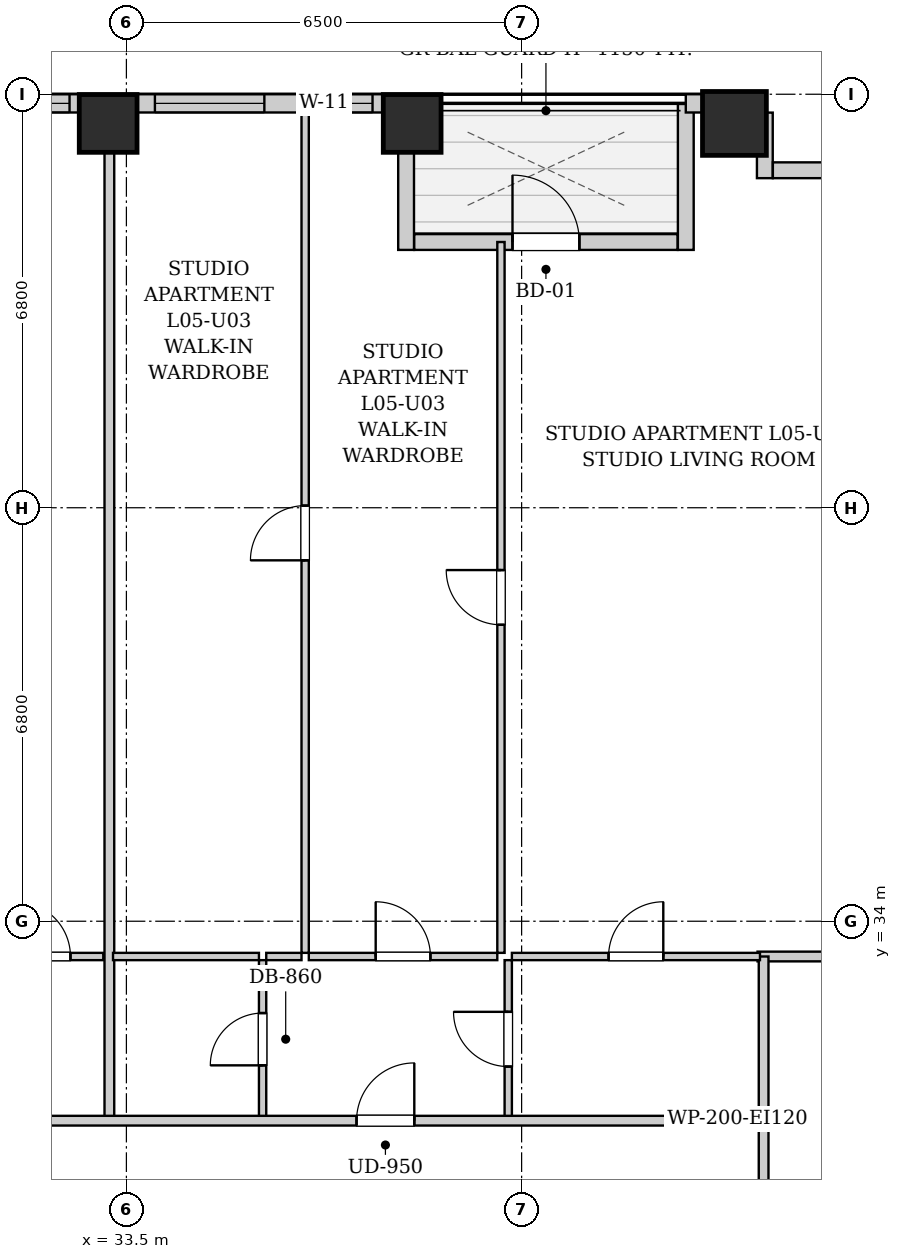
"""IFC4 building model, lengths in metres.
Left out: names, types, materials, properties, quantities, classifications, styles, units other than length and angle.
Written with IfcOpenShell. Run it as: python <this file> out.ifc"""

import sys

from ifc_helpers import new_model, si_unit, direction, frame, frame_2d, origin, origin_2d, place, context, subcontext, project, spatial, rectangle, extrude, element, fill, save


model = new_model("IFC4")
c1 = context("Model", 3, precision=1e-05, world=origin(), true_north=direction((0.0, 1.0)))
c2 = subcontext(c1, "Body", "Model", "MODEL_VIEW")
j1 = project(units=[si_unit("LENGTHUNIT", "METRE"), si_unit("PLANEANGLEUNIT", "RADIAN")], contexts=[c1])
p1 = place(None, origin())
s1 = spatial("IfcSite", under=j1, at=p1, CompositionType="ELEMENT")
p2 = place(p1, origin())
s2 = spatial("IfcBuilding", under=s1, at=p2, CompositionType="ELEMENT")
p3 = place(p2, frame((0.0, 0.0, 25.8)))
s3 = spatial("IfcBuildingStorey", under=s2, at=p3, CompositionType="ELEMENT", Elevation=25.8)
for number, where, z_axis, x_axis in (
    (1, (33.2, 47.12, 0.0), (0.0, 0.0, 1.0), (1.0, 0.0, 0.0)),
    (2, (38.2, 47.12, 0.0), (0.0, 0.0, 1.0), (1.0, 0.0, 0.0)),
):
    element("IfcColumn", number, at=place(p3, frame(where, z_axis=z_axis, x_axis=x_axis)), inside=s3, PredefinedType="COLUMN", context=c2, shape_type="SweptSolid", body=[
        extrude(rectangle(XDim=0.95, YDim=0.95, at=origin_2d()), origin(), (0.0, 0.0, 1.0), 3.2),
    ])
p4 = place(p3, frame((43.5, 47.12, 0.0), z_axis=(0.0, 0.0, 1.0), x_axis=(1.0, 0.0, 0.0)))
e3 = element("IfcColumn", 3, at=p4, inside=s3, PredefinedType="COLUMN", context=c2, shape_type="SweptSolid", body=[
    extrude(rectangle(XDim=1.05, YDim=1.05, at=origin_2d()), origin(), (0.0, 0.0, 1.0), 3.2),
])
p5 = place(p3, frame((10.0, 47.45, 0.0), z_axis=(0.0, 0.0, 1.0), x_axis=(1.0, 0.0, 0.0)))
e4 = element("IfcWall", 4, at=p5, inside=s3, PredefinedType="SOLIDWALL", context=c2, shape_type="SweptSolid", body=[
    extrude(rectangle(XDim=28.1, YDim=0.3, at=frame_2d((14.05, 0.0))), origin(), (0.0, 0.0, 1.0), 1.975),
])
p6 = place(p5, frame((5.712, 0.0, 0.55)))
e5 = element("IfcOpeningElement", 5, at=p6, cuts=e4, PredefinedType="OPENING", context=c2, shape_type="SweptSolid", body=[
    extrude(rectangle(XDim=1.35, YDim=1.2, at=frame_2d((0.675, 0.6))), frame((0.0, 0.16, 0.0), z_axis=(0.0, -1.0, 0.0), x_axis=(1.0, 0.0, 0.0)), (0.0, 0.0, 1.0), 0.32),
])
p7 = place(p5, frame((8.792, 0.0, 0.55)))
e6 = element("IfcOpeningElement", 6, at=p7, cuts=e4, PredefinedType="OPENING", context=c2, shape_type="SweptSolid", body=[
    extrude(rectangle(XDim=1.8, YDim=1.2, at=frame_2d((0.9, 0.6))), frame((0.0, 0.16, 0.0), z_axis=(0.0, -1.0, 0.0), x_axis=(1.0, 0.0, 0.0)), (0.0, 0.0, 1.0), 0.32),
])
p8 = place(p5, frame((18.86, 0.0, 0.55)))
e7 = element("IfcOpeningElement", 7, at=p8, cuts=e4, PredefinedType="OPENING", context=c2, shape_type="SweptSolid", body=[
    extrude(rectangle(XDim=1.8, YDim=1.2, at=frame_2d((0.9, 0.6))), frame((0.0, 0.16, 0.0), z_axis=(0.0, -1.0, 0.0), x_axis=(1.0, 0.0, 0.0)), (0.0, 0.0, 1.0), 0.32),
])
p9 = place(p5, frame((21.215, 0.0, 0.55)))
e8 = element("IfcOpeningElement", 8, at=p9, cuts=e4, PredefinedType="OPENING", context=c2, shape_type="SweptSolid", body=[
    extrude(rectangle(XDim=1.35, YDim=1.2, at=frame_2d((0.675, 0.6))), frame((0.0, 0.16, 0.0), z_axis=(0.0, -1.0, 0.0), x_axis=(1.0, 0.0, 0.0)), (0.0, 0.0, 1.0), 0.32),
])
p10 = place(p5, frame((23.969, 0.0, 0.55)))
e9 = element("IfcOpeningElement", 9, at=p10, cuts=e4, PredefinedType="OPENING", context=c2, shape_type="SweptSolid", body=[
    extrude(rectangle(XDim=1.8, YDim=1.2, at=frame_2d((0.9, 0.6))), frame((0.0, 0.16, 0.0), z_axis=(0.0, -1.0, 0.0), x_axis=(1.0, 0.0, 0.0)), (0.0, 0.0, 1.0), 0.32),
])
p11 = place(p5, frame((26.698, 0.0, 0.55)))
e10 = element("IfcOpeningElement", 10, at=p11, cuts=e4, PredefinedType="OPENING", context=c2, shape_type="SweptSolid", body=[
    extrude(rectangle(XDim=0.85, YDim=1.2, at=frame_2d((0.425, 0.6))), frame((0.0, 0.16, 0.0), z_axis=(0.0, -1.0, 0.0), x_axis=(1.0, 0.0, 0.0)), (0.0, 0.0, 1.0), 0.32),
])
p12 = place(p3, frame((38.1, 47.44, 0.0), z_axis=(0.0, 0.0, 1.0), x_axis=(0.0, -1.0, 0.0)))
e11 = element("IfcWall", 11, at=p12, inside=s3, PredefinedType="SOLIDWALL", context=c2, shape_type="SweptSolid", body=[
    extrude(rectangle(XDim=2.4, YDim=0.26, at=frame_2d((1.2, 0.0))), origin(), (0.0, 0.0, 1.0), 2.94),
])
p13 = place(p3, frame((38.234, 45.17, 0.0), z_axis=(0.0, 0.0, 1.0), x_axis=(1.0, 0.0, 0.0)))
e12 = element("IfcWall", 12, at=p13, inside=s3, PredefinedType="SOLIDWALL", context=c2, shape_type="SweptSolid", body=[
    extrude(rectangle(XDim=4.332, YDim=0.26, at=frame_2d((2.166, 0.0))), origin(), (0.0, 0.0, 1.0), 2.94),
])
p14 = place(p13, frame((1.616, 0.0, 0.0)))
e13 = element("IfcOpeningElement", 13, at=p14, cuts=e12, PredefinedType="OPENING", context=c2, shape_type="SweptSolid", body=[
    extrude(rectangle(XDim=1.1, YDim=2.0, at=frame_2d((0.55, 1.0))), frame((0.0, 0.14, 0.0), z_axis=(0.0, -1.0, 0.0), x_axis=(1.0, 0.0, 0.0)), (0.0, 0.0, 1.0), 0.28),
])
p15 = place(p3, frame((42.7, 45.04, 0.0), z_axis=(0.0, 0.0, 1.0), x_axis=(0.0, 1.0, 0.0)))
e14 = element("IfcWall", 14, at=p15, inside=s3, PredefinedType="SOLIDWALL", context=c2, shape_type="SweptSolid", body=[
    extrude(rectangle(XDim=2.4, YDim=0.26, at=frame_2d((1.2, 0.0))), origin(), (0.0, 0.0, 1.0), 2.94),
])
p16 = place(p3, frame((42.7, 47.45, 0.0), z_axis=(0.0, 0.0, 1.0), x_axis=(1.0, 0.0, 0.0)))
e15 = element("IfcWall", 15, at=p16, inside=s3, PredefinedType="SOLIDWALL", context=c2, shape_type="SweptSolid", body=[
    extrude(rectangle(XDim=1.3, YDim=0.3, at=frame_2d((0.65, 0.0))), origin(), (0.0, 0.0, 1.0), 1.975),
])
p17 = place(p3, frame((44.0, 47.298, 0.0), z_axis=(0.0, 0.0, 1.0), x_axis=(0.0, -1.0, 0.0)))
e16 = element("IfcWall", 16, at=p17, inside=s3, PredefinedType="SOLIDWALL", context=c2, shape_type="SweptSolid", body=[
    extrude(rectangle(XDim=1.078, YDim=0.26, at=frame_2d((0.539, 0.0))), origin(), (0.0, 0.0, 1.0), 2.94),
])
p18 = place(p3, frame((44.132, 46.35, 0.0), z_axis=(0.0, 0.0, 1.0), x_axis=(1.0, 0.0, 0.0)))
e17 = element("IfcWall", 17, at=p18, inside=s3, PredefinedType="SOLIDWALL", context=c2, shape_type="SweptSolid", body=[
    extrude(rectangle(XDim=1.248, YDim=0.26, at=frame_2d((0.624, 0.0))), origin(), (0.0, 0.0, 1.0), 2.94),
])
p19 = place(p3, frame((43.98, 28.98, 0.0), z_axis=(0.0, 0.0, 1.0), x_axis=(0.0, 1.0, 0.0)))
e18 = element("IfcWall", 18, at=p19, inside=s3, PredefinedType="PARTITIONING", context=c2, shape_type="SweptSolid", body=[
    extrude(rectangle(XDim=1.74, YDim=0.16, at=frame_2d((0.87, 0.0))), origin(), (0.0, 0.0, 1.0), 2.94),
])
p20 = place(p3, frame((31.14, 33.42, 0.0), z_axis=(0.0, 0.0, 1.0), x_axis=(1.0, 0.0, 0.0)))
e19 = element("IfcWall", 19, at=p20, inside=s3, PredefinedType="PARTITIONING", context=c2, shape_type="SweptSolid", body=[
    extrude(rectangle(XDim=1.98, YDim=0.12, at=frame_2d((0.99, 0.0))), origin(), (0.0, 0.0, 1.0), 2.94),
])
p21 = place(p20, frame((0.54, 0.0, 0.0)))
e20 = element("IfcOpeningElement", 20, at=p21, cuts=e19, PredefinedType="OPENING", context=c2, shape_type="SweptSolid", body=[
    extrude(rectangle(XDim=0.9, YDim=2.05, at=frame_2d((0.45, 1.025))), frame((0.0, 0.07, 0.0), z_axis=(0.0, -1.0, 0.0), x_axis=(1.0, 0.0, 0.0)), (0.0, 0.0, 1.0), 0.14),
])
p22 = place(p3, frame((43.88, 33.42, 0.0), z_axis=(0.0, 0.0, 1.0), x_axis=(1.0, 0.0, 0.0)))
e21 = element("IfcWall", 21, at=p22, inside=s3, PredefinedType="PARTITIONING", context=c2, shape_type="SweptSolid", body=[
    extrude(rectangle(XDim=2.34, YDim=0.16, at=frame_2d((1.17, 0.0))), origin(), (0.0, 0.0, 1.0), 2.94),
])
p23 = place(p3, frame((43.98, 30.76, 0.0), z_axis=(0.0, 0.0, 1.0), x_axis=(0.0, 1.0, 0.0)))
e22 = element("IfcWall", 22, at=p23, inside=s3, PredefinedType="PARTITIONING", context=c2, shape_type="SweptSolid", body=[
    extrude(rectangle(XDim=2.66, YDim=0.16, at=frame_2d((1.33, 0.0))), origin(), (0.0, 0.0, 1.0), 2.94),
])
p24 = place(p3, frame((33.22, 30.76, 0.0), z_axis=(0.0, 0.0, 1.0), x_axis=(0.0, 1.0, 0.0)))
e23 = element("IfcWall", 23, at=p24, inside=s3, PredefinedType="PARTITIONING", context=c2, shape_type="SweptSolid", body=[
    extrude(rectangle(XDim=16.56, YDim=0.16, at=frame_2d((8.28, 0.0))), origin(), (0.0, 0.0, 1.0), 2.155),
])
p25 = place(p3, frame((35.74, 30.76, 0.0), z_axis=(0.0, 0.0, 1.0), x_axis=(0.0, 1.0, 0.0)))
e24 = element("IfcWall", 24, at=p25, inside=s3, PredefinedType="PARTITIONING", context=c2, shape_type="SweptSolid", body=[
    extrude(rectangle(XDim=2.6, YDim=0.12, at=frame_2d((1.3, 0.0))), origin(), (0.0, 0.0, 1.0), 2.94),
])
p26 = place(p25, frame((0.87, 0.0, 0.0)))
e25 = element("IfcOpeningElement", 25, at=p26, cuts=e24, PredefinedType="OPENING", context=c2, shape_type="SweptSolid", body=[
    extrude(rectangle(XDim=0.86, YDim=2.05, at=frame_2d((0.43, 1.025))), frame((0.0, 0.07, 0.0), z_axis=(0.0, -1.0, 0.0), x_axis=(1.0, 0.0, 0.0)), (0.0, 0.0, 1.0), 0.14),
])
p27 = place(p3, frame((33.28, 33.42, 0.0), z_axis=(0.0, 0.0, 1.0), x_axis=(1.0, 0.0, 0.0)))
e26 = element("IfcWall", 26, at=p27, inside=s3, PredefinedType="PARTITIONING", context=c2, shape_type="SweptSolid", body=[
    extrude(rectangle(XDim=2.4, YDim=0.12, at=frame_2d((1.2, 0.0))), origin(), (0.0, 0.0, 1.0), 2.94),
])
p28 = place(p3, frame((39.78, 30.76, 0.0), z_axis=(0.0, 0.0, 1.0), x_axis=(0.0, 1.0, 0.0)))
e27 = element("IfcWall", 27, at=p28, inside=s3, PredefinedType="PARTITIONING", context=c2, shape_type="SweptSolid", body=[
    extrude(rectangle(XDim=2.6, YDim=0.12, at=frame_2d((1.3, 0.0))), origin(), (0.0, 0.0, 1.0), 2.94),
])
p29 = place(p28, frame((0.85, 0.0, 0.0)))
e28 = element("IfcOpeningElement", 28, at=p29, cuts=e27, PredefinedType="OPENING", context=c2, shape_type="SweptSolid", body=[
    extrude(rectangle(XDim=0.9, YDim=2.05, at=frame_2d((0.45, 1.025))), frame((0.0, 0.07, 0.0), z_axis=(0.0, -1.0, 0.0), x_axis=(1.0, 0.0, 0.0)), (0.0, 0.0, 1.0), 0.14),
])
p30 = place(p3, frame((35.8, 33.42, 0.0), z_axis=(0.0, 0.0, 1.0), x_axis=(1.0, 0.0, 0.0)))
e29 = element("IfcWall", 29, at=p30, inside=s3, PredefinedType="PARTITIONING", context=c2, shape_type="SweptSolid", body=[
    extrude(rectangle(XDim=0.58, YDim=0.12, at=frame_2d((0.29, 0.0))), origin(), (0.0, 0.0, 1.0), 2.94),
])
p31 = place(p3, frame((36.5, 33.42, 0.0), z_axis=(0.0, 0.0, 1.0), x_axis=(1.0, 0.0, 0.0)))
e30 = element("IfcWall", 30, at=p31, inside=s3, PredefinedType="PARTITIONING", context=c2, shape_type="SweptSolid", body=[
    extrude(rectangle(XDim=3.1, YDim=0.12, at=frame_2d((1.55, 0.0))), origin(), (0.0, 0.0, 1.0), 2.94),
])
p32 = place(p31, frame((1.1, 0.0, 0.0)))
e31 = element("IfcOpeningElement", 31, at=p32, cuts=e30, PredefinedType="OPENING", context=c2, shape_type="SweptSolid", body=[
    extrude(rectangle(XDim=0.9, YDim=2.05, at=frame_2d((0.45, 1.025))), frame((0.0, 0.07, 0.0), z_axis=(0.0, -1.0, 0.0), x_axis=(1.0, 0.0, 0.0)), (0.0, 0.0, 1.0), 0.14),
])
p33 = place(p3, frame((39.84, 33.42, 0.0), z_axis=(0.0, 0.0, 1.0), x_axis=(1.0, 0.0, 0.0)))
e32 = element("IfcWall", 32, at=p33, inside=s3, PredefinedType="PARTITIONING", context=c2, shape_type="SweptSolid", body=[
    extrude(rectangle(XDim=4.08, YDim=0.12, at=frame_2d((2.04, 0.0))), origin(), (0.0, 0.0, 1.0), 2.94),
])
p34 = place(p33, frame((1.59, 0.0, 0.0)))
e33 = element("IfcOpeningElement", 33, at=p34, cuts=e32, PredefinedType="OPENING", context=c2, shape_type="SweptSolid", body=[
    extrude(rectangle(XDim=0.9, YDim=2.05, at=frame_2d((0.45, 1.025))), frame((0.0, 0.07, 0.0), z_axis=(0.0, -1.0, 0.0), x_axis=(1.0, 0.0, 0.0)), (0.0, 0.0, 1.0), 0.14),
])
p35 = place(p3, frame((36.44, 33.48, 0.0), z_axis=(0.0, 0.0, 1.0), x_axis=(0.0, 1.0, 0.0)))
e34 = element("IfcWall", 34, at=p35, inside=s3, PredefinedType="PARTITIONING", context=c2, shape_type="SweptSolid", body=[
    extrude(rectangle(XDim=13.84, YDim=0.12, at=frame_2d((6.92, 0.0))), origin(), (0.0, 0.0, 1.0), 2.94),
])
p36 = place(p35, frame((6.455, 0.0, 0.0)))
e35 = element("IfcOpeningElement", 35, at=p36, cuts=e34, PredefinedType="OPENING", context=c2, shape_type="SweptSolid", body=[
    extrude(rectangle(XDim=0.9, YDim=2.05, at=frame_2d((0.45, 1.025))), frame((0.0, 0.07, 0.0), z_axis=(0.0, -1.0, 0.0), x_axis=(1.0, 0.0, 0.0)), (0.0, 0.0, 1.0), 0.14),
])
p37 = place(p3, frame((39.66, 33.48, 0.0), z_axis=(0.0, 0.0, 1.0), x_axis=(0.0, 1.0, 0.0)))
e36 = element("IfcWall", 36, at=p37, inside=s3, PredefinedType="PARTITIONING", context=c2, shape_type="SweptSolid", body=[
    extrude(rectangle(XDim=11.69, YDim=0.12, at=frame_2d((5.845, 0.0))), origin(), (0.0, 0.0, 1.0), 2.94),
])
p38 = place(p37, frame((5.395, 0.0, 0.0)))
e37 = element("IfcOpeningElement", 37, at=p38, cuts=e36, PredefinedType="OPENING", context=c2, shape_type="SweptSolid", body=[
    extrude(rectangle(XDim=0.9, YDim=2.05, at=frame_2d((0.45, 1.025))), frame((0.0, 0.07, 0.0), z_axis=(0.0, -1.0, 0.0), x_axis=(1.0, 0.0, 0.0)), (0.0, 0.0, 1.0), 0.14),
])
p39 = place(p3, frame((10.05, 30.72, 0.0), z_axis=(0.0, 0.0, 1.0), x_axis=(1.0, 0.0, 0.0)))
e38 = element("IfcWall", 38, at=p39, inside=s3, PredefinedType="PARTITIONING", context=c2, shape_type="SweptSolid", body=[
    extrude(rectangle(XDim=33.9, YDim=0.16, at=frame_2d((16.95, 0.0))), origin(), (0.0, 0.0, 1.0), 2.94),
])
p40 = place(p39, frame((4.295, 0.0, 0.0)))
e39 = element("IfcOpeningElement", 39, at=p40, cuts=e38, PredefinedType="OPENING", context=c2, shape_type="SweptSolid", body=[
    extrude(rectangle(XDim=0.95, YDim=2.1, at=frame_2d((0.475, 1.05))), frame((0.0, 0.09, 0.0), z_axis=(0.0, -1.0, 0.0), x_axis=(1.0, 0.0, 0.0)), (0.0, 0.0, 1.0), 0.18),
])
p41 = place(p39, frame((27.235, 0.0, 0.0)))
e40 = element("IfcOpeningElement", 40, at=p41, cuts=e38, PredefinedType="OPENING", context=c2, shape_type="SweptSolid", body=[
    extrude(rectangle(XDim=0.95, YDim=2.1, at=frame_2d((0.475, 1.05))), frame((0.0, 0.09, 0.0), z_axis=(0.0, -1.0, 0.0), x_axis=(1.0, 0.0, 0.0)), (0.0, 0.0, 1.0), 0.18),
])
p42 = place(p21, origin())
e41 = element("IfcDoor", 41, at=p42, inside=s3, OperationType="SINGLE_SWING_LEFT", PredefinedType="DOOR", context=c2, shape_type="SweptSolid", body=[
    extrude(rectangle(XDim=0.9, YDim=2.05, at=frame_2d((0.45, 1.025))), frame((0.0, 0.025, 0.0), z_axis=(0.0, -1.0, 0.0), x_axis=(1.0, 0.0, 0.0)), (0.0, 0.0, 1.0), 0.05),
])
fill(e20, e41)
p43 = place(p26, origin())
e42 = element("IfcDoor", 42, at=p43, inside=s3, OperationType="SINGLE_SWING_LEFT", PredefinedType="DOOR", context=c2, shape_type="SweptSolid", body=[
    extrude(rectangle(XDim=0.86, YDim=2.05, at=frame_2d((0.43, 1.025))), frame((0.0, 0.025, 0.0), z_axis=(0.0, -1.0, 0.0), x_axis=(1.0, 0.0, 0.0)), (0.0, 0.0, 1.0), 0.05),
])
fill(e25, e42)
p44 = place(p29, origin())
e43 = element("IfcDoor", 43, at=p44, inside=s3, OperationType="SINGLE_SWING_RIGHT", PredefinedType="DOOR", context=c2, shape_type="SweptSolid", body=[
    extrude(rectangle(XDim=0.9, YDim=2.05, at=frame_2d((0.45, 1.025))), frame((0.0, 0.025, 0.0), z_axis=(0.0, -1.0, 0.0), x_axis=(1.0, 0.0, 0.0)), (0.0, 0.0, 1.0), 0.05),
])
fill(e28, e43)
p45 = place(p32, origin())
e44 = element("IfcDoor", 44, at=p45, inside=s3, OperationType="SINGLE_SWING_LEFT", PredefinedType="DOOR", context=c2, shape_type="SweptSolid", body=[
    extrude(rectangle(XDim=0.9, YDim=2.05, at=frame_2d((0.45, 1.025))), frame((0.0, 0.025, 0.0), z_axis=(0.0, -1.0, 0.0), x_axis=(1.0, 0.0, 0.0)), (0.0, 0.0, 1.0), 0.05),
])
fill(e31, e44)
p46 = place(p34, origin())
e45 = element("IfcDoor", 45, at=p46, inside=s3, OperationType="SINGLE_SWING_RIGHT", PredefinedType="DOOR", context=c2, shape_type="SweptSolid", body=[
    extrude(rectangle(XDim=0.9, YDim=2.05, at=frame_2d((0.45, 1.025))), frame((0.0, 0.025, 0.0), z_axis=(0.0, -1.0, 0.0), x_axis=(1.0, 0.0, 0.0)), (0.0, 0.0, 1.0), 0.05),
])
fill(e33, e45)
p47 = place(p36, origin())
e46 = element("IfcDoor", 46, at=p47, inside=s3, OperationType="SINGLE_SWING_LEFT", PredefinedType="DOOR", context=c2, shape_type="SweptSolid", body=[
    extrude(rectangle(XDim=0.9, YDim=2.05, at=frame_2d((0.45, 1.025))), frame((0.0, 0.025, 0.0), z_axis=(0.0, -1.0, 0.0), x_axis=(1.0, 0.0, 0.0)), (0.0, 0.0, 1.0), 0.05),
])
fill(e35, e46)
p48 = place(p38, origin())
e47 = element("IfcDoor", 47, at=p48, inside=s3, OperationType="SINGLE_SWING_RIGHT", PredefinedType="DOOR", context=c2, shape_type="SweptSolid", body=[
    extrude(rectangle(XDim=0.9, YDim=2.05, at=frame_2d((0.45, 1.025))), frame((0.0, 0.025, 0.0), z_axis=(0.0, -1.0, 0.0), x_axis=(1.0, 0.0, 0.0)), (0.0, 0.0, 1.0), 0.05),
])
fill(e37, e47)
p49 = place(p41, origin())
e48 = element("IfcDoor", 48, at=p49, inside=s3, OperationType="SINGLE_SWING_RIGHT", PredefinedType="DOOR", context=c2, shape_type="SweptSolid", body=[
    extrude(rectangle(XDim=0.95, YDim=2.1, at=frame_2d((0.475, 1.05))), frame((0.0, 0.025, 0.0), z_axis=(0.0, -1.0, 0.0), x_axis=(1.0, 0.0, 0.0)), (0.0, 0.0, 1.0), 0.05),
])
fill(e40, e48)
p50 = place(p14, origin())
e49 = element("IfcDoor", 49, at=p50, inside=s3, OperationType="SINGLE_SWING_LEFT", PredefinedType="DOOR", context=c2, shape_type="SweptSolid", body=[
    extrude(rectangle(XDim=1.1, YDim=2.0, at=frame_2d((0.55, 1.0))), frame((0.0, 0.025, 0.0), z_axis=(0.0, -1.0, 0.0), x_axis=(1.0, 0.0, 0.0)), (0.0, 0.0, 1.0), 0.05),
])
fill(e13, e49)
p51 = place(p9, origin())
e50 = element("IfcWindow", 50, at=p51, inside=s3, PartitioningType="SINGLE_PANEL", PredefinedType="WINDOW", context=c2, shape_type="SweptSolid", body=[
    extrude(rectangle(XDim=1.35, YDim=1.2, at=frame_2d((0.675, 0.6))), frame((0.0, 0.03, 0.0), z_axis=(0.0, -1.0, 0.0), x_axis=(1.0, 0.0, 0.0)), (0.0, 0.0, 1.0), 0.06),
])
fill(e8, e50)
p52 = place(p10, origin())
e51 = element("IfcWindow", 51, at=p52, inside=s3, PartitioningType="DOUBLE_PANEL_VERTICAL", PredefinedType="WINDOW", context=c2, shape_type="SweptSolid", body=[
    extrude(rectangle(XDim=1.8, YDim=1.2, at=frame_2d((0.9, 0.6))), frame((0.0, 0.03, 0.0), z_axis=(0.0, -1.0, 0.0), x_axis=(1.0, 0.0, 0.0)), (0.0, 0.0, 1.0), 0.06),
])
fill(e9, e51)
p53 = place(p11, origin())
e52 = element("IfcWindow", 52, at=p53, inside=s3, PartitioningType="SINGLE_PANEL", PredefinedType="WINDOW", context=c2, shape_type="SweptSolid", body=[
    extrude(rectangle(XDim=0.85, YDim=1.2, at=frame_2d((0.425, 0.6))), frame((0.0, 0.03, 0.0), z_axis=(0.0, -1.0, 0.0), x_axis=(1.0, 0.0, 0.0)), (0.0, 0.0, 1.0), 0.06),
])
fill(e10, e52)
save(model, sys.argv[1])
